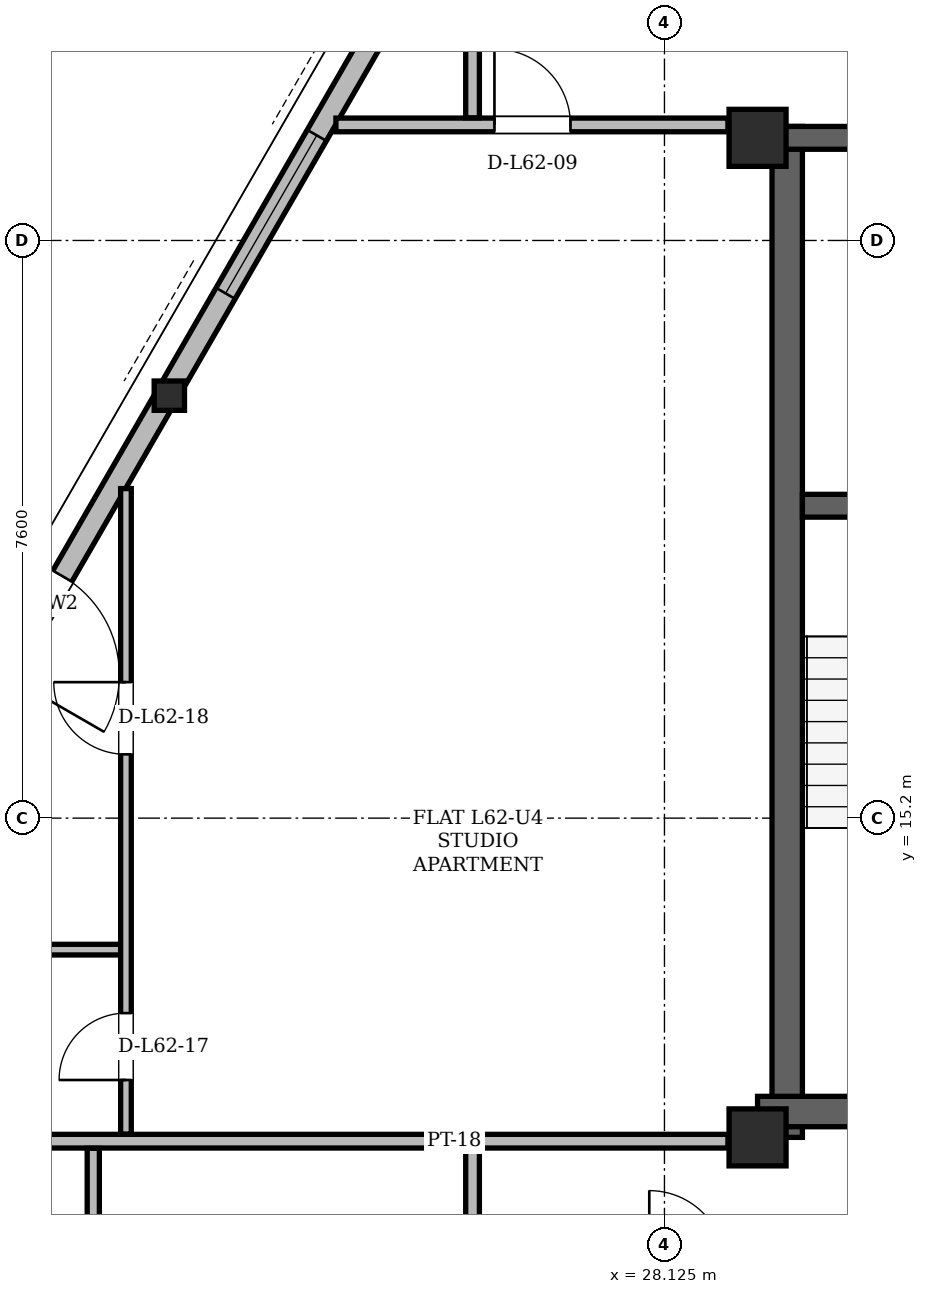
"""IFC4 building model, lengths in metres.
Left out: names, types, materials, properties, quantities, classifications, styles, units other than length and angle.
Written with IfcOpenShell. Run it as: python <this file> out.ifc"""

import sys

from ifc_helpers import new_model, si_unit, direction, frame, frame_2d, origin, origin_2d, place, context, subcontext, project, spatial, rectangle, hollow_rectangle, i_section, extrude, element, fill, save


model = new_model("IFC4")
c1 = context("Model", 3, precision=1e-05, world=origin(), true_north=direction((0.0, 1.0)))
c2 = subcontext(c1, "Body", "Model", "MODEL_VIEW")
j1 = project(units=[si_unit("LENGTHUNIT", "METRE"), si_unit("PLANEANGLEUNIT", "RADIAN")], contexts=[c1])
p1 = place(None, origin())
s1 = spatial("IfcSite", under=j1, at=p1, CompositionType="ELEMENT")
p2 = place(p1, origin())
s2 = spatial("IfcBuilding", under=s1, at=p2, CompositionType="ELEMENT")
p3 = place(p2, frame((0.0, 0.0, 234.3)))
s3 = spatial("IfcBuildingStorey", under=s2, at=p3, CompositionType="ELEMENT", Elevation=234.3)
for number, where, z_axis, x_axis in (
    (1, (29.35, 11.0, 0.0), (0.0, 0.0, 1.0), (1.0, 0.0, 0.0)),
    (2, (29.35, 24.15, 0.0), (0.0, 0.0, 1.0), (1.0, 0.0, 0.0)),
):
    element("IfcColumn", number, at=place(p3, frame(where, z_axis=z_axis, x_axis=x_axis)), inside=s3, PredefinedType="COLUMN", context=c2, shape_type="SweptSolid", body=[
        extrude(hollow_rectangle(XDim=0.75, YDim=0.75, WallThickness=0.06, at=origin_2d()), origin(), (0.0, 0.0, 1.0), 3.6),
    ])
p4 = place(p3, frame((21.586, 20.779, 0.004), z_axis=(0.013866832544, -0.011351769779, 0.999839411245), x_axis=(0.633444321555, 0.773788273037, 0.0)))
e3 = element("IfcColumn", 3, at=p4, inside=s3, PredefinedType="COLUMN", context=c2, shape_type="SweptSolid", body=[
    extrude(i_section(OverallWidth=0.399, OverallDepth=0.386, WebThickness=0.021, FlangeThickness=0.033, at=origin_2d()), origin(), (0.0, 0.0, 1.0), 3.592),
])
p5 = place(p3, frame((29.74, 11.0, 0.0), z_axis=(0.0, 0.0, 1.0), x_axis=(0.0, 1.0, 0.0)))
e4 = element("IfcWall", 4, at=p5, inside=s3, PredefinedType="SHEAR", context=c2, shape_type="SweptSolid", body=[
    extrude(rectangle(XDim=13.3, YDim=0.4, at=frame_2d((6.65, 0.0))), origin(), (0.0, 0.0, 1.0), 3.38),
])
p6 = place(p3, frame((29.35, 11.34, 0.0), z_axis=(0.0, 0.0, 1.0), x_axis=(1.0, 0.0, 0.0)))
e5 = element("IfcWall", 5, at=p6, inside=s3, PredefinedType="SHEAR", context=c2, shape_type="SweptSolid", body=[
    extrude(rectangle(XDim=7.1, YDim=0.4, at=frame_2d((3.55, 0.0))), origin(), (0.0, 0.0, 1.0), 3.38),
])
p7 = place(p3, frame((29.65, 24.15, 0.0), z_axis=(0.0, 0.0, 1.0), x_axis=(1.0, 0.0, 0.0)))
e6 = element("IfcWall", 6, at=p7, inside=s3, PredefinedType="SHEAR", context=c2, shape_type="SweptSolid", body=[
    extrude(rectangle(XDim=15.7, YDim=0.3, at=frame_2d((7.85, 0.0))), origin(), (0.0, 0.0, 1.0), 3.38),
])
p8 = place(p7, frame((1.7, 0.0, 0.0)))
e7 = element("IfcOpeningElement", 7, at=p8, cuts=e6, PredefinedType="OPENING", context=c2, shape_type="SweptSolid", body=[
    extrude(rectangle(XDim=1.2, YDim=2.2, at=frame_2d((0.6, 1.1))), frame((0.0, 0.15, 0.0), z_axis=(0.0, -1.0, 0.0), x_axis=(1.0, 0.0, 0.0)), (0.0, 0.0, 1.0), 0.3),
])
p9 = place(p7, frame((12.8, 0.0, 0.0)))
e8 = element("IfcOpeningElement", 8, at=p9, cuts=e6, PredefinedType="OPENING", context=c2, shape_type="SweptSolid", body=[
    extrude(rectangle(XDim=1.2, YDim=2.2, at=frame_2d((0.6, 1.1))), frame((0.0, 0.15, 0.0), z_axis=(0.0, -1.0, 0.0), x_axis=(1.0, 0.0, 0.0)), (0.0, 0.0, 1.0), 0.3),
])
p10 = place(p7, frame((7.4, 0.0, 0.0)))
e9 = element("IfcOpeningElement", 9, at=p10, cuts=e6, PredefinedType="OPENING", context=c2, shape_type="SweptSolid", body=[
    extrude(rectangle(XDim=0.9, YDim=2.05, at=frame_2d((0.45, 1.025))), frame((0.0, 0.15, 0.0), z_axis=(0.0, -1.0, 0.0), x_axis=(1.0, 0.0, 0.0)), (0.0, 0.0, 1.0), 0.3),
])
p11 = place(p3, frame((29.94, 19.31, 0.0), z_axis=(0.0, 0.0, 1.0), x_axis=(1.0, 0.0, 0.0)))
e10 = element("IfcWall", 10, at=p11, inside=s3, PredefinedType="SHEAR", context=c2, shape_type="SweptSolid", body=[
    extrude(rectangle(XDim=4.01, YDim=0.3, at=frame_2d((2.005, 0.0))), origin(), (0.0, 0.0, 1.0), 3.38),
])
p12 = place(p11, frame((1.01, 0.0, 0.0)))
e11 = element("IfcOpeningElement", 11, at=p12, cuts=e10, PredefinedType="OPENING", context=c2, shape_type="SweptSolid", body=[
    extrude(rectangle(XDim=1.4, YDim=2.2, at=frame_2d((0.7, 1.1))), frame((0.0, 0.15, 0.0), z_axis=(0.0, -1.0, 0.0), x_axis=(1.0, 0.0, 0.0)), (0.0, 0.0, 1.0), 0.3),
])
p13 = place(p3, frame((34.482, 43.116, 0.0), z_axis=(0.0, 0.0, 1.0), x_axis=(-0.500000614513, -0.866025048995, 0.0)))
e12 = element("IfcWall", 12, at=p13, inside=s3, PredefinedType="SOLIDWALL", context=c2, shape_type="SweptSolid", body=[
    extrude(rectangle(XDim=36.848, YDim=0.29, at=frame_2d((18.424, 0.0))), origin(), (0.0, 0.0, 1.0), 2.677),
])
p14 = place(p13, frame((8.034, 0.0, 0.0)))
e13 = element("IfcOpeningElement", 13, at=p14, cuts=e12, PredefinedType="OPENING", context=c2, shape_type="SweptSolid", body=[
    extrude(rectangle(XDim=1.5, YDim=2.2, at=frame_2d((0.75, 1.1))), frame((0.0, 0.145, 0.0), z_axis=(0.0, -1.0, 0.0), x_axis=(1.0, 0.0, 0.0)), (0.0, 0.0, 1.0), 0.29),
])
p15 = place(p13, frame((28.559, 0.0, 0.0)))
e14 = element("IfcOpeningElement", 14, at=p15, cuts=e12, PredefinedType="OPENING", context=c2, shape_type="SweptSolid", body=[
    extrude(rectangle(XDim=1.5, YDim=2.2, at=frame_2d((0.75, 1.1))), frame((0.0, 0.145, 0.0), z_axis=(0.0, -1.0, 0.0), x_axis=(1.0, 0.0, 0.0)), (0.0, 0.0, 1.0), 0.29),
])
p16 = place(p13, frame((21.863, 0.0, 0.85)))
e15 = element("IfcOpeningElement", 15, at=p16, cuts=e12, PredefinedType="OPENING", context=c2, shape_type="SweptSolid", body=[
    extrude(rectangle(XDim=2.4, YDim=1.717, at=frame_2d((1.2, 0.858))), frame((0.0, 0.145, 0.0), z_axis=(0.0, -1.0, 0.0), x_axis=(1.0, 0.0, 0.0)), (0.0, 0.0, 1.0), 0.29),
])
p17 = place(p13, frame((34.677, 0.0, 0.85)))
e16 = element("IfcOpeningElement", 16, at=p17, cuts=e12, PredefinedType="OPENING", context=c2, shape_type="SweptSolid", body=[
    extrude(rectangle(XDim=1.2, YDim=1.48, at=frame_2d((0.6, 0.74))), frame((0.0, 0.145, 0.0), z_axis=(0.0, -1.0, 0.0), x_axis=(1.0, 0.0, 0.0)), (0.0, 0.0, 1.0), 0.29),
])
p18 = place(p13, frame((32.477, 0.0, 0.85)))
e17 = element("IfcOpeningElement", 17, at=p18, cuts=e12, PredefinedType="OPENING", context=c2, shape_type="SweptSolid", body=[
    extrude(rectangle(XDim=1.4, YDim=1.6, at=frame_2d((0.7, 0.8))), frame((0.0, 0.145, 0.0), z_axis=(0.0, -1.0, 0.0), x_axis=(1.0, 0.0, 0.0)), (0.0, 0.0, 1.0), 0.29),
])
p19 = place(p13, frame((12.14, 0.0, 0.85)))
e18 = element("IfcOpeningElement", 18, at=p19, cuts=e12, PredefinedType="OPENING", context=c2, shape_type="SweptSolid", body=[
    extrude(rectangle(XDim=1.2, YDim=1.48, at=frame_2d((0.6, 0.74))), frame((0.0, 0.145, 0.0), z_axis=(0.0, -1.0, 0.0), x_axis=(1.0, 0.0, 0.0)), (0.0, 0.0, 1.0), 0.29),
])
p20 = place(p13, frame((16.54, 0.0, 0.85)))
e19 = element("IfcOpeningElement", 19, at=p20, cuts=e12, PredefinedType="OPENING", context=c2, shape_type="SweptSolid", body=[
    extrude(rectangle(XDim=2.0, YDim=1.717, at=frame_2d((1.0, 0.858))), frame((0.0, 0.145, 0.0), z_axis=(0.0, -1.0, 0.0), x_axis=(1.0, 0.0, 0.0)), (0.0, 0.0, 1.0), 0.29),
])
p21 = place(p13, frame((2.059, 0.0, 0.85)))
e20 = element("IfcOpeningElement", 20, at=p21, cuts=e12, PredefinedType="OPENING", context=c2, shape_type="SweptSolid", body=[
    extrude(rectangle(XDim=1.2, YDim=1.48, at=frame_2d((0.6, 0.74))), frame((0.0, 0.145, 0.0), z_axis=(0.0, -1.0, 0.0), x_axis=(1.0, 0.0, 0.0)), (0.0, 0.0, 1.0), 0.29),
])
p22 = place(p3, frame((16.445, 10.95, 0.0), z_axis=(0.0, 0.0, 1.0), x_axis=(1.0, 0.0, 0.0)))
e21 = element("IfcWall", 21, at=p22, inside=s3, PredefinedType="PARTITIONING", context=c2, shape_type="SweptSolid", body=[
    extrude(rectangle(XDim=12.515, YDim=0.18, at=frame_2d((6.258, 0.0))), origin(), (0.0, 0.0, 1.0), 2.913),
])
p23 = place(p3, frame((17.538, 13.47, 0.0), z_axis=(0.0, 0.0, 1.0), x_axis=(1.0, 0.0, 0.0)))
e22 = element("IfcWall", 22, at=p23, inside=s3, PredefinedType="PARTITIONING", context=c2, shape_type="SweptSolid", body=[
    extrude(rectangle(XDim=3.499, YDim=0.14, at=frame_2d((1.75, 0.0))), origin(), (0.0, 0.0, 1.0), 3.38),
])
p24 = place(p3, frame((23.802, 24.32, 0.0), z_axis=(0.0, 0.0, 1.0), x_axis=(1.0, 0.0, 0.0)))
e23 = element("IfcWall", 23, at=p24, inside=s3, PredefinedType="PARTITIONING", context=c2, shape_type="SweptSolid", body=[
    extrude(rectangle(XDim=5.158, YDim=0.18, at=frame_2d((2.579, 0.0))), origin(), (0.0, 0.0, 1.0), 3.38),
])
p25 = place(p24, frame((2.086, 0.0, 0.0)))
e24 = element("IfcOpeningElement", 24, at=p25, cuts=e23, PredefinedType="OPENING", context=c2, shape_type="SweptSolid", body=[
    extrude(rectangle(XDim=1.0, YDim=2.18, at=frame_2d((0.5, 1.09))), frame((0.0, 0.09, 0.0), z_axis=(0.0, -1.0, 0.0), x_axis=(1.0, 0.0, 0.0)), (0.0, 0.0, 1.0), 0.18),
])
p26 = place(p3, frame((20.61, 6.127, 0.0), z_axis=(0.0, 0.0, 1.0), x_axis=(0.0, 1.0, 0.0)))
e25 = element("IfcWall", 25, at=p26, inside=s3, PredefinedType="PARTITIONING", context=c2, shape_type="SweptSolid", body=[
    extrude(rectangle(XDim=4.729, YDim=0.16, at=frame_2d((2.364, 0.0))), origin(), (0.0, 0.0, 1.0), 2.913),
])
p27 = place(p26, frame((1.972, 0.0, 0.0)))
e26 = element("IfcOpeningElement", 26, at=p27, cuts=e25, PredefinedType="OPENING", context=c2, shape_type="SweptSolid", body=[
    extrude(rectangle(XDim=0.88, YDim=2.08, at=frame_2d((0.44, 1.04))), frame((0.0, 0.08, 0.0), z_axis=(0.0, -1.0, 0.0), x_axis=(1.0, 0.0, 0.0)), (0.0, 0.0, 1.0), 0.16),
])
p28 = place(p3, frame((21.04, 11.044, 0.0), z_axis=(0.0, 0.0, 1.0), x_axis=(0.0, 1.0, 0.0)))
e27 = element("IfcWall", 27, at=p28, inside=s3, PredefinedType="PARTITIONING", context=c2, shape_type="SweptSolid", body=[
    extrude(rectangle(XDim=8.492, YDim=0.14, at=frame_2d((4.246, 0.0))), origin(), (0.0, 0.0, 1.0), 3.38),
])
p29 = place(p28, frame((0.711, 0.0, 0.0)))
e28 = element("IfcOpeningElement", 28, at=p29, cuts=e27, PredefinedType="OPENING", context=c2, shape_type="SweptSolid", body=[
    extrude(rectangle(XDim=0.88, YDim=2.08, at=frame_2d((0.44, 1.04))), frame((0.0, 0.07, 0.0), z_axis=(0.0, -1.0, 0.0), x_axis=(1.0, 0.0, 0.0)), (0.0, 0.0, 1.0), 0.14),
])
p30 = place(p28, frame((4.995, 0.0, 0.0)))
e29 = element("IfcOpeningElement", 29, at=p30, cuts=e27, PredefinedType="OPENING", context=c2, shape_type="SweptSolid", body=[
    extrude(rectangle(XDim=0.95, YDim=2.1, at=frame_2d((0.475, 1.05))), frame((0.0, 0.07, 0.0), z_axis=(0.0, -1.0, 0.0), x_axis=(1.0, 0.0, 0.0)), (0.0, 0.0, 1.0), 0.14),
])
for number, where, z_axis, x_axis in (
    (30, (25.6, 9.394, 0.0), (0.0, 0.0, 1.0), (0.0, 1.0, 0.0)),
    (31, (25.6, 24.414, 0.0), (0.0, 0.0, 1.0), (0.0, 1.0, 0.0)),
):
    element("IfcWall", number, at=place(p3, frame(where, z_axis=z_axis, x_axis=x_axis)), inside=s3, PredefinedType="PARTITIONING", context=c2, shape_type="SweptSolid", body=[
        extrude(rectangle(XDim=1.462, YDim=0.18, at=frame_2d((0.731, 0.0))), origin(), (0.0, 0.0, 1.0), 3.38),
    ])
p31 = place(p15, origin())
e32 = element("IfcDoor", 32, at=p31, inside=s3, OperationType="SINGLE_SWING_RIGHT", PredefinedType="DOOR", context=c2, shape_type="SweptSolid", body=[
    extrude(rectangle(XDim=1.5, YDim=2.2, at=frame_2d((0.75, 1.1))), frame((0.0, 0.025, 0.0), z_axis=(0.0, -1.0, 0.0), x_axis=(1.0, 0.0, 0.0)), (0.0, 0.0, 1.0), 0.05),
])
fill(e14, e32)
p32 = place(p16, origin())
e33 = element("IfcWindow", 33, at=p32, inside=s3, PartitioningType="SINGLE_PANEL", PredefinedType="WINDOW", context=c2, shape_type="SweptSolid", body=[
    extrude(rectangle(XDim=2.4, YDim=1.717, at=frame_2d((1.2, 0.858))), frame((0.0, 0.03, 0.0), z_axis=(0.0, -1.0, 0.0), x_axis=(1.0, 0.0, 0.0)), (0.0, 0.0, 1.0), 0.06),
])
fill(e15, e33)
p33 = place(p25, origin())
e34 = element("IfcDoor", 34, at=p33, inside=s3, OperationType="SINGLE_SWING_LEFT", PredefinedType="DOOR", context=c2, shape_type="SweptSolid", body=[
    extrude(rectangle(XDim=1.0, YDim=2.18, at=frame_2d((0.5, 1.09))), frame((0.0, 0.025, 0.0), z_axis=(0.0, -1.0, 0.0), x_axis=(1.0, 0.0, 0.0)), (0.0, 0.0, 1.0), 0.05),
])
fill(e24, e34)
p34 = place(p29, origin())
e35 = element("IfcDoor", 35, at=p34, inside=s3, OperationType="SINGLE_SWING_LEFT", PredefinedType="DOOR", context=c2, shape_type="SweptSolid", body=[
    extrude(rectangle(XDim=0.88, YDim=2.08, at=frame_2d((0.44, 1.04))), frame((0.0, 0.025, 0.0), z_axis=(0.0, -1.0, 0.0), x_axis=(1.0, 0.0, 0.0)), (0.0, 0.0, 1.0), 0.05),
])
fill(e28, e35)
p35 = place(p30, origin())
e36 = element("IfcDoor", 36, at=p35, inside=s3, OperationType="SINGLE_SWING_RIGHT", PredefinedType="DOOR", context=c2, shape_type="SweptSolid", body=[
    extrude(rectangle(XDim=0.95, YDim=2.1, at=frame_2d((0.475, 1.05))), frame((0.0, 0.025, 0.0), z_axis=(0.0, -1.0, 0.0), x_axis=(1.0, 0.0, 0.0)), (0.0, 0.0, 1.0), 0.05),
])
fill(e29, e36)
save(model, sys.argv[1])
